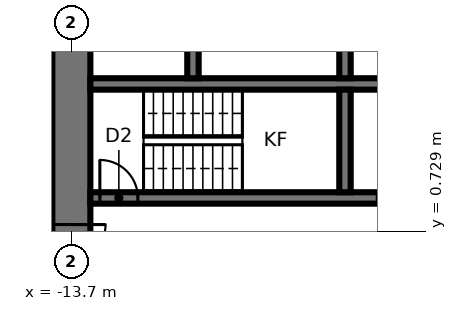
"""IFC4 building model, lengths in metres.
Left out: names, types, materials, properties, quantities, classifications, styles, units other than length and angle.
Written with IfcOpenShell. Run it as: python <this file> out.ifc"""

import sys

from ifc_helpers import new_model, si_unit, direction, frame, frame_2d, origin, place, context, subcontext, project, spatial, rectangle, extrude, element, fill, save


model = new_model("IFC4")
c1 = context("Model", 3, precision=1e-05, world=origin(), true_north=direction((0.0, 1.0)))
c2 = subcontext(c1, "Body", "Model", "MODEL_VIEW")
j1 = project(units=[si_unit("LENGTHUNIT", "METRE"), si_unit("PLANEANGLEUNIT", "RADIAN")], contexts=[c1])
p1 = place(None, origin())
s1 = spatial("IfcSite", under=j1, at=p1, CompositionType="ELEMENT")
p2 = place(p1, origin())
s2 = spatial("IfcBuilding", under=s1, at=p2, CompositionType="ELEMENT")
p3 = place(p2, frame((0.0, 0.0, 92.4)))
s3 = spatial("IfcBuildingStorey", under=s2, at=p3, CompositionType="ELEMENT", Elevation=92.4)
p4 = place(p3, frame((-13.7, 9.5, 0.0), z_axis=(0.0, 0.0, 1.0), x_axis=(0.0, -1.0, 0.0)))
e1 = element("IfcWall", 1, at=p4, inside=s3, PredefinedType="SHEAR", context=c2, shape_type="SweptSolid", body=[
    extrude(rectangle(XDim=19.0, YDim=1.0, at=frame_2d((9.5, 0.0))), origin(), (0.0, 0.0, 1.0), 3.9),
])
p5 = place(p4, frame((8.6, 0.0, 0.0)))
e2 = element("IfcOpeningElement", 2, at=p5, cuts=e1, PredefinedType="OPENING", context=c2, shape_type="SweptSolid", body=[
    extrude(rectangle(XDim=1.8, YDim=2.4, at=frame_2d((0.9, 1.2))), frame((0.0, 0.51, 0.0), z_axis=(0.0, -1.0, 0.0), x_axis=(1.0, 0.0, 0.0)), (0.0, 0.0, 1.0), 1.02),
])
p6 = place(p3, frame((-13.2, 1.6, 0.0), z_axis=(0.0, 0.0, 1.0), x_axis=(1.0, 0.0, 0.0)))
e3 = element("IfcWall", 3, at=p6, inside=s3, PredefinedType="SHEAR", context=c2, shape_type="SweptSolid", body=[
    extrude(rectangle(XDim=26.4, YDim=0.3, at=frame_2d((13.2, 0.0))), origin(), (0.0, 0.0, 1.0), 3.9),
])
p7 = place(p6, frame((0.25, 0.0, 0.0)))
e4 = element("IfcOpeningElement", 4, at=p7, cuts=e3, PredefinedType="OPENING", context=c2, shape_type="SweptSolid", body=[
    extrude(rectangle(XDim=1.0, YDim=2.1, at=frame_2d((0.5, 1.05))), frame((0.0, 0.16, 0.0), z_axis=(0.0, -1.0, 0.0), x_axis=(1.0, 0.0, 0.0)), (0.0, 0.0, 1.0), 0.32),
])
p8 = place(p6, frame((20.25, 0.0, 0.0)))
e5 = element("IfcOpeningElement", 5, at=p8, cuts=e3, PredefinedType="OPENING", context=c2, shape_type="SweptSolid", body=[
    extrude(rectangle(XDim=1.5, YDim=2.4, at=frame_2d((0.75, 1.2))), frame((0.0, 0.16, 0.0), z_axis=(0.0, -1.0, 0.0), x_axis=(1.0, 0.0, 0.0)), (0.0, 0.0, 1.0), 0.32),
])
p9 = place(p6, frame((7.55, 0.0, 0.0)))
e6 = element("IfcOpeningElement", 6, at=p9, cuts=e3, PredefinedType="OPENING", context=c2, shape_type="SweptSolid", body=[
    extrude(rectangle(XDim=0.9, YDim=2.1, at=frame_2d((0.45, 1.05))), frame((0.0, 0.16, 0.0), z_axis=(0.0, -1.0, 0.0), x_axis=(1.0, 0.0, 0.0)), (0.0, 0.0, 1.0), 0.32),
])
p10 = place(p6, frame((10.15, 0.0, 0.0)))
e7 = element("IfcOpeningElement", 7, at=p10, cuts=e3, PredefinedType="OPENING", context=c2, shape_type="SweptSolid", body=[
    extrude(rectangle(XDim=0.9, YDim=2.1, at=frame_2d((0.45, 1.05))), frame((0.0, 0.16, 0.0), z_axis=(0.0, -1.0, 0.0), x_axis=(1.0, 0.0, 0.0)), (0.0, 0.0, 1.0), 0.32),
])
p11 = place(p6, frame((12.75, 0.0, 0.0)))
e8 = element("IfcOpeningElement", 8, at=p11, cuts=e3, PredefinedType="OPENING", context=c2, shape_type="SweptSolid", body=[
    extrude(rectangle(XDim=0.9, YDim=2.1, at=frame_2d((0.45, 1.05))), frame((0.0, 0.16, 0.0), z_axis=(0.0, -1.0, 0.0), x_axis=(1.0, 0.0, 0.0)), (0.0, 0.0, 1.0), 0.32),
])
p12 = place(p6, frame((24.15, 0.0, 0.0)))
e9 = element("IfcOpeningElement", 9, at=p12, cuts=e3, PredefinedType="OPENING", context=c2, shape_type="SweptSolid", body=[
    extrude(rectangle(XDim=0.9, YDim=2.1, at=frame_2d((0.45, 1.05))), frame((0.0, 0.16, 0.0), z_axis=(0.0, -1.0, 0.0), x_axis=(1.0, 0.0, 0.0)), (0.0, 0.0, 1.0), 0.32),
])
p13 = place(p3, frame((-13.2, 4.6, 0.0), z_axis=(0.0, 0.0, 1.0), x_axis=(1.0, 0.0, 0.0)))
e10 = element("IfcWall", 10, at=p13, inside=s3, PredefinedType="SHEAR", context=c2, shape_type="SweptSolid", body=[
    extrude(rectangle(XDim=26.4, YDim=0.3, at=frame_2d((13.2, 0.0))), origin(), (0.0, 0.0, 1.0), 3.9),
])
p14 = place(p3, frame((-6.5, 1.75, 0.0), z_axis=(0.0, 0.0, 1.0), x_axis=(0.0, 1.0, 0.0)))
e11 = element("IfcWall", 11, at=p14, inside=s3, PredefinedType="SHEAR", context=c2, shape_type="SweptSolid", body=[
    extrude(rectangle(XDim=2.7, YDim=0.3, at=frame_2d((1.35, 0.0))), origin(), (0.0, 0.0, 1.0), 3.9),
])
for number, where, z_axis, x_axis in (
    (12, (-6.5, 4.75, 0.0), (0.0, 0.0, 1.0), (0.0, 1.0, 0.0)),
    (13, (-10.5, 4.75, 0.0), (0.0, 0.0, 1.0), (0.0, 1.0, 0.0)),
):
    element("IfcWall", number, at=place(p3, frame(where, z_axis=z_axis, x_axis=x_axis)), inside=s3, PredefinedType="SHEAR", context=c2, shape_type="SweptSolid", body=[
        extrude(rectangle(XDim=3.75, YDim=0.3, at=frame_2d((1.875, 0.0))), origin(), (0.0, 0.0, 1.0), 3.9),
    ])
p15 = place(p5, origin())
e14 = element("IfcDoor", 14, at=p15, inside=s3, OperationType="DOUBLE_DOOR_SINGLE_SWING", PredefinedType="DOOR", context=c2, shape_type="SweptSolid", body=[
    extrude(rectangle(XDim=1.72, YDim=2.36, at=frame_2d((0.9, 1.18))), frame((0.0, 0.025, 0.0), z_axis=(0.0, -1.0, 0.0), x_axis=(1.0, 0.0, 0.0)), (0.0, 0.0, 1.0), 0.05),
    extrude(rectangle(XDim=0.04, YDim=2.4, at=frame_2d((0.02, 1.2))), frame((0.0, 0.25, 0.0), z_axis=(0.0, -1.0, 0.0), x_axis=(1.0, 0.0, 0.0)), (0.0, 0.0, 1.0), 0.5),
    extrude(rectangle(XDim=0.04, YDim=2.4, at=frame_2d((1.78, 1.2))), frame((0.0, 0.25, 0.0), z_axis=(0.0, -1.0, 0.0), x_axis=(1.0, 0.0, 0.0)), (0.0, 0.0, 1.0), 0.5),
    extrude(rectangle(XDim=1.72, YDim=0.04, at=frame_2d((0.9, 2.38))), frame((0.0, 0.25, 0.0), z_axis=(0.0, -1.0, 0.0), x_axis=(1.0, 0.0, 0.0)), (0.0, 0.0, 1.0), 0.5),
])
fill(e2, e14)
p16 = place(p7, origin())
e15 = element("IfcDoor", 15, at=p16, inside=s3, OperationType="SINGLE_SWING_LEFT", PredefinedType="DOOR", context=c2, shape_type="SweptSolid", body=[
    extrude(rectangle(XDim=1.0, YDim=2.1, at=frame_2d((0.5, 1.05))), frame((0.0, 0.025, 0.0), z_axis=(0.0, -1.0, 0.0), x_axis=(1.0, 0.0, 0.0)), (0.0, 0.0, 1.0), 0.05),
])
fill(e4, e15)
save(model, sys.argv[1])
